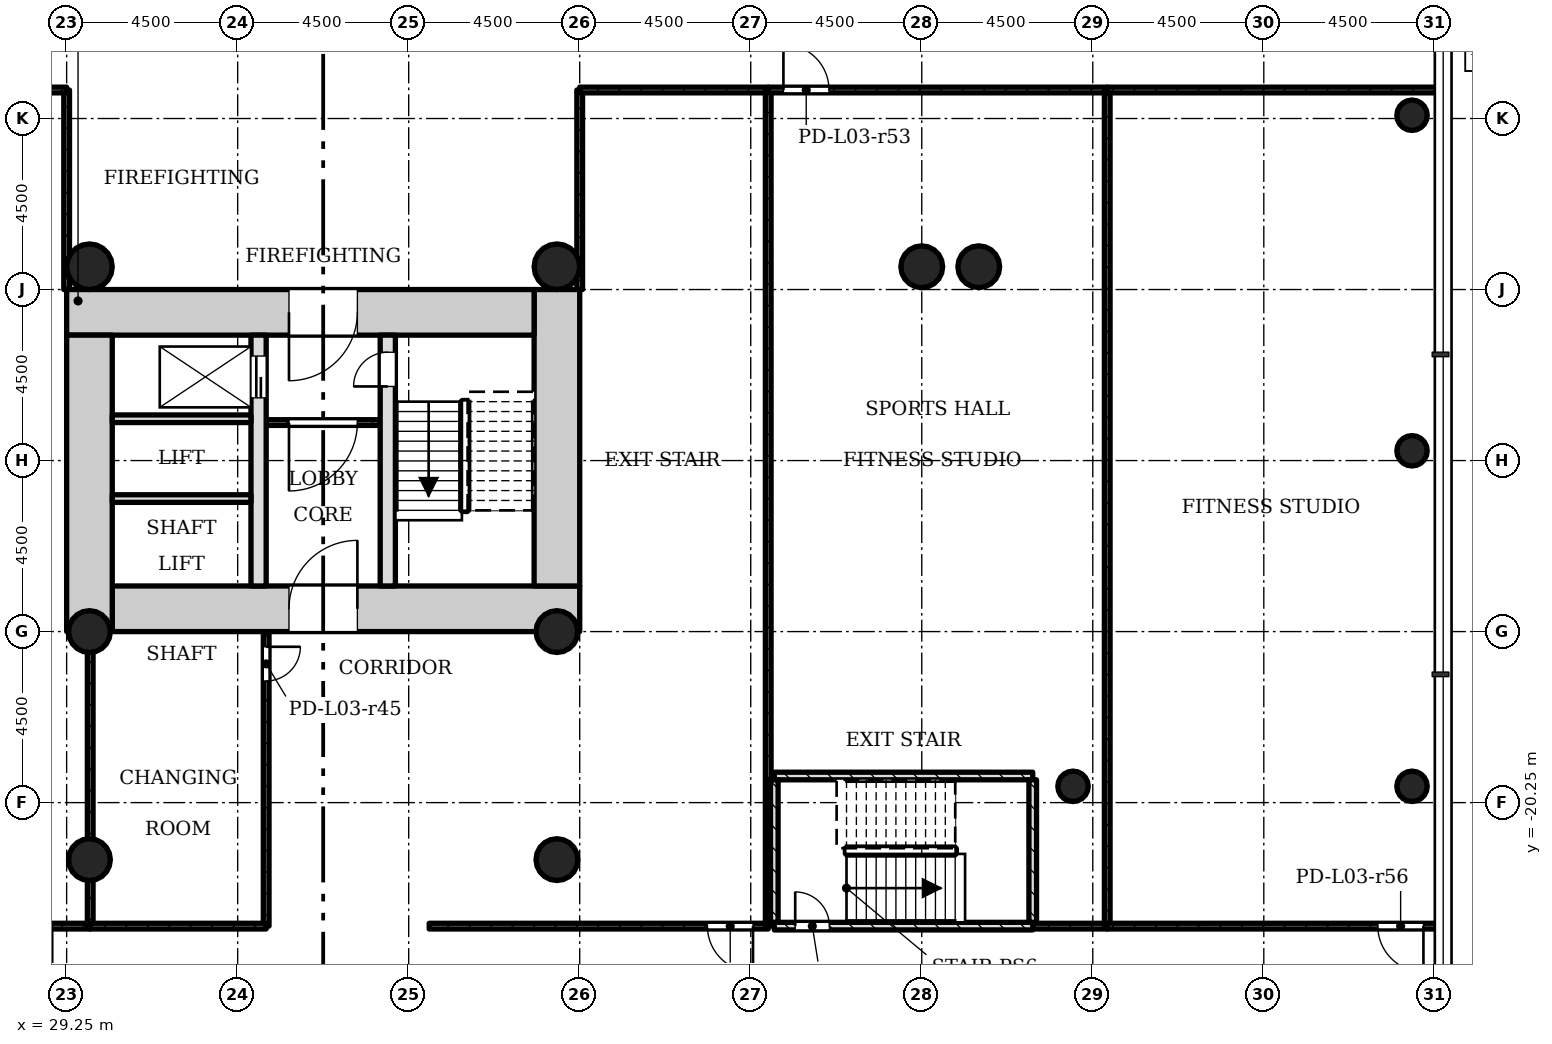
"""IFC4 building model, lengths in metres.
Left out: names, types, materials, properties, quantities, classifications, styles, units other than length and angle.
Written with IfcOpenShell. Run it as: python <this file> out.ifc"""

import sys

from ifc_helpers import new_model, si_unit, direction, frame, frame_2d, origin, origin_2d, place, context, subcontext, project, spatial, rectangle, hollow_circle, extrude, element, fill, save


model = new_model("IFC4")
c1 = context("Model", 3, precision=1e-05, world=origin(), true_north=direction((0.0, 1.0)))
c2 = subcontext(c1, "Body", "Model", "MODEL_VIEW")
j1 = project(units=[si_unit("LENGTHUNIT", "METRE"), si_unit("PLANEANGLEUNIT", "RADIAN")], contexts=[c1])
p1 = place(None, origin())
s1 = spatial("IfcSite", under=j1, at=p1, CompositionType="ELEMENT")
p2 = place(p1, origin())
s2 = spatial("IfcBuilding", under=s1, at=p2, CompositionType="ELEMENT")
p3 = place(p2, frame((0.0, 0.0, 15.5)))
s3 = spatial("IfcBuildingStorey", under=s2, at=p3, CompositionType="ELEMENT", Elevation=15.5)
p4 = place(p3, frame((30.45, -15.15, 0.0), z_axis=(0.0, 0.0, 1.0), x_axis=(1.0, 0.0, 0.0)))
e1 = element("IfcWall", 1, at=p4, inside=s3, PredefinedType="SHEAR", context=c2, shape_type="SweptSolid", body=[
    extrude(rectangle(XDim=12.3, YDim=1.2, at=frame_2d((6.15, 0.0))), origin(), (0.0, 0.0, 1.0), 4.5),
])
p5 = place(p4, frame((4.65, 0.0, 0.0)))
e2 = element("IfcOpeningElement", 2, at=p5, cuts=e1, PredefinedType="OPENING", context=c2, shape_type="SweptSolid", body=[
    extrude(rectangle(XDim=1.8, YDim=2.1, at=frame_2d((0.9, 1.05))), frame((0.0, 0.61, 0.0), z_axis=(0.0, -1.0, 0.0), x_axis=(1.0, 0.0, 0.0)), (0.0, 0.0, 1.0), 1.22),
])
p6 = place(p3, frame((42.15, -14.55, 0.0), z_axis=(0.0, 0.0, 1.0), x_axis=(0.0, 1.0, 0.0)))
e3 = element("IfcWall", 3, at=p6, inside=s3, PredefinedType="SHEAR", context=c2, shape_type="SweptSolid", body=[
    extrude(rectangle(XDim=7.8, YDim=1.2, at=frame_2d((3.9, 0.0))), origin(), (0.0, 0.0, 1.0), 4.5),
])
p7 = place(p3, frame((41.55, -7.35, 0.0), z_axis=(0.0, 0.0, 1.0), x_axis=(-1.0, 0.0, 0.0)))
e4 = element("IfcWall", 4, at=p7, inside=s3, PredefinedType="SHEAR", context=c2, shape_type="SweptSolid", body=[
    extrude(rectangle(XDim=12.3, YDim=1.2, at=frame_2d((6.15, 0.0))), origin(), (0.0, 0.0, 1.0), 4.5),
])
p8 = place(p7, frame((4.65, 0.0, 0.0)))
e5 = element("IfcOpeningElement", 5, at=p8, cuts=e4, PredefinedType="OPENING", context=c2, shape_type="SweptSolid", body=[
    extrude(rectangle(XDim=1.8, YDim=2.1, at=frame_2d((0.9, 1.05))), frame((0.0, 0.61, 0.0), z_axis=(0.0, -1.0, 0.0), x_axis=(1.0, 0.0, 0.0)), (0.0, 0.0, 1.0), 1.22),
])
p9 = place(p3, frame((29.85, -7.95, 0.0), z_axis=(0.0, 0.0, 1.0), x_axis=(0.0, -1.0, 0.0)))
e6 = element("IfcWall", 6, at=p9, inside=s3, PredefinedType="SHEAR", context=c2, shape_type="SweptSolid", body=[
    extrude(rectangle(XDim=7.8, YDim=1.2, at=frame_2d((3.9, 0.0))), origin(), (0.0, 0.0, 1.0), 4.5),
])
p10 = place(p3, frame((34.3, -14.55, 0.0), z_axis=(0.0, 0.0, 1.0), x_axis=(0.0, 1.0, 0.0)))
e7 = element("IfcWall", 7, at=p10, inside=s3, PredefinedType="SHEAR", context=c2, shape_type="SweptSolid", body=[
    extrude(rectangle(XDim=6.6, YDim=0.4, at=frame_2d((3.3, 0.0))), origin(), (0.0, 0.0, 1.0), 4.5),
])
p11 = place(p10, frame((4.95, 0.0, 0.0)))
e8 = element("IfcOpeningElement", 8, at=p11, cuts=e7, PredefinedType="OPENING", context=c2, shape_type="SweptSolid", body=[
    extrude(rectangle(XDim=1.1, YDim=2.1, at=frame_2d((0.55, 1.05))), frame((0.0, 0.21, 0.0), z_axis=(0.0, -1.0, 0.0), x_axis=(1.0, 0.0, 0.0)), (0.0, 0.0, 1.0), 0.42),
])
p12 = place(p3, frame((37.7, -14.55, 0.0), z_axis=(0.0, 0.0, 1.0), x_axis=(0.0, 1.0, 0.0)))
e9 = element("IfcWall", 9, at=p12, inside=s3, PredefinedType="SHEAR", context=c2, shape_type="SweptSolid", body=[
    extrude(rectangle(XDim=6.6, YDim=0.4, at=frame_2d((3.3, 0.0))), origin(), (0.0, 0.0, 1.0), 4.5),
])
p13 = place(p12, frame((5.25, 0.0, 0.0)))
e10 = element("IfcOpeningElement", 10, at=p13, cuts=e9, PredefinedType="OPENING", context=c2, shape_type="SweptSolid", body=[
    extrude(rectangle(XDim=0.9, YDim=2.1, at=frame_2d((0.45, 1.05))), frame((0.0, 0.21, 0.0), z_axis=(0.0, -1.0, 0.0), x_axis=(1.0, 0.0, 0.0)), (0.0, 0.0, 1.0), 0.42),
])
for number, where, z_axis, x_axis in (
    (11, (42.15, -15.75, 0.0), (0.0, 0.0, 1.0), (1.0, 0.0, 0.0)),
    (12, (29.85, -15.75, 0.0), (0.0, 0.0, 1.0), (1.0, 0.0, 0.0)),
    (13, (42.15, -21.75, 0.0), (0.0, 0.0, 1.0), (1.0, 0.0, 0.0)),
    (14, (29.85, -21.75, 0.0), (0.0, 0.0, 1.0), (1.0, 0.0, 0.0)),
    (15, (51.75, -6.15, 0.0), (0.0, 0.0, 1.0), (1.0, 0.0, 0.0)),
    (16, (53.25, -6.15, 0.0), (0.0, 0.0, 1.0), (1.0, 0.0, 0.0)),
):
    element("IfcColumn", number, at=place(p3, frame(where, z_axis=z_axis, x_axis=x_axis)), inside=s3, PredefinedType="COLUMN", context=c2, shape_type="SweptSolid", body=[
        extrude(hollow_circle(Radius=0.55, WallThickness=0.04, at=origin_2d()), origin(), (0.0, 0.0, 1.0), 4.5),
    ])
for number, where, z_axis, x_axis in (
    (17, (42.15, -6.15, 0.0), (0.0, 0.0, 1.0), (1.0, 0.0, 0.0)),
    (18, (29.85, -6.15, 0.0), (0.0, 0.0, 1.0), (1.0, 0.0, 0.0)),
):
    element("IfcColumn", number, at=place(p3, frame(where, z_axis=z_axis, x_axis=x_axis)), inside=s3, PredefinedType="COLUMN", context=c2, shape_type="SweptSolid", body=[
        extrude(hollow_circle(Radius=0.6, WallThickness=0.045, at=origin_2d()), origin(), (0.0, 0.0, 1.0), 4.5),
    ])
for number, where, z_axis, x_axis in (
    (19, (55.73, -19.821, 0.0), (0.0, 0.0, 1.0), (1.0, 0.0, 0.0)),
    (20, (64.65, -19.821, 0.0), (0.0, 0.0, 1.0), (1.0, 0.0, 0.0)),
    (21, (64.65, -10.993, 0.0), (0.0, 0.0, 1.0), (1.0, 0.0, 0.0)),
    (22, (64.65, -2.164, 0.0), (0.0, 0.0, 1.0), (1.0, 0.0, 0.0)),
):
    element("IfcColumn", number, at=place(p3, frame(where, z_axis=z_axis, x_axis=x_axis)), inside=s3, PredefinedType="COLUMN", context=c2, shape_type="SweptSolid", body=[
        extrude(hollow_circle(Radius=0.4, WallThickness=0.028, at=origin_2d()), origin(), (0.0, 0.0, 1.0), 4.5),
    ])
p14 = place(p3, frame((34.5, -10.25, 0.0), z_axis=(0.0, 0.0, 1.0), x_axis=(1.0, 0.0, 0.0)))
e23 = element("IfcWall", 23, at=p14, inside=s3, PredefinedType="PARTITIONING", context=c2, shape_type="SweptSolid", body=[
    extrude(rectangle(XDim=3.0, YDim=0.15, at=frame_2d((1.5, 0.0))), origin(), (0.0, 0.0, 1.0), 4.08),
])
p15 = place(p14, frame((0.6, 0.0, 0.0)))
e24 = element("IfcOpeningElement", 24, at=p15, cuts=e23, PredefinedType="OPENING", context=c2, shape_type="SweptSolid", body=[
    extrude(rectangle(XDim=1.8, YDim=2.1, at=frame_2d((0.9, 1.05))), frame((0.0, 0.085, 0.0), z_axis=(0.0, -1.0, 0.0), x_axis=(1.0, 0.0, 0.0)), (0.0, 0.0, 1.0), 0.17),
])
for number, where, z_axis, x_axis in (
    (25, (30.45, -10.15, 0.0), (0.0, 0.0, 1.0), (1.0, 0.0, 0.0)),
    (26, (30.45, -12.25, 0.0), (0.0, 0.0, 1.0), (1.0, 0.0, 0.0)),
):
    element("IfcWall", number, at=place(p3, frame(where, z_axis=z_axis, x_axis=x_axis)), inside=s3, PredefinedType="SOLIDWALL", context=c2, shape_type="SweptSolid", body=[
        extrude(rectangle(XDim=3.65, YDim=0.2, at=frame_2d((1.825, 0.0))), origin(), (0.0, 0.0, 1.0), 4.08),
    ])
p16 = place(p3, frame((29.25, -1.5, 0.0), z_axis=(0.0, 0.0, 1.0), x_axis=(0.0, -1.0, 0.0)))
e27 = element("IfcWall", 27, at=p16, inside=s3, PredefinedType="PARTITIONING", context=c2, shape_type="SweptSolid", body=[
    extrude(rectangle(XDim=5.25, YDim=0.15, at=frame_2d((2.625, 0.0))), origin(), (0.0, 0.0, 1.0), 4.08),
])
p17 = place(p3, frame((29.87, -23.5, 0.0), z_axis=(0.0, 0.0, 1.0), x_axis=(-1.0, 0.0, 0.0)))
e28 = element("IfcWall", 28, at=p17, inside=s3, PredefinedType="PARTITIONING", context=c2, shape_type="SweptSolid", body=[
    extrude(rectangle(XDim=8.92, YDim=0.15, at=frame_2d((4.46, 0.0))), origin(), (0.0, 0.0, 1.0), 4.08),
])
p18 = place(p17, frame((1.0, 0.0, 0.0)))
e29 = element("IfcOpeningElement", 29, at=p18, cuts=e28, PredefinedType="OPENING", context=c2, shape_type="SweptSolid", body=[
    extrude(rectangle(XDim=1.2, YDim=2.1, at=frame_2d((0.6, 1.05))), frame((0.0, 0.085, 0.0), z_axis=(0.0, -1.0, 0.0), x_axis=(1.0, 0.0, 0.0)), (0.0, 0.0, 1.0), 0.17),
])
p19 = place(p3, frame((20.95, -1.5, 0.0), z_axis=(0.0, 0.0, 1.0), x_axis=(1.0, 0.0, 0.0)))
e30 = element("IfcWall", 30, at=p19, inside=s3, PredefinedType="PARTITIONING", context=c2, shape_type="SweptSolid", body=[
    extrude(rectangle(XDim=8.3, YDim=0.15, at=frame_2d((4.15, 0.0))), origin(), (0.0, 0.0, 1.0), 4.08),
])
p20 = place(p3, frame((29.87, -15.75, 0.0), z_axis=(0.0, 0.0, 1.0), x_axis=(0.0, -1.0, 0.0)))
e31 = element("IfcWall", 31, at=p20, inside=s3, PredefinedType="PARTITIONING", context=c2, shape_type="SweptSolid", body=[
    extrude(rectangle(XDim=7.75, YDim=0.15, at=frame_2d((3.875, 0.0))), origin(), (0.0, 0.0, 1.0), 4.08),
])
p21 = place(p3, frame((34.5, -15.75, 0.0), z_axis=(0.0, 0.0, 1.0), x_axis=(0.0, -1.0, 0.0)))
e32 = element("IfcWall", 32, at=p21, inside=s3, PredefinedType="PARTITIONING", context=c2, shape_type="SweptSolid", body=[
    extrude(rectangle(XDim=7.75, YDim=0.15, at=frame_2d((3.875, 0.0))), origin(), (0.0, 0.0, 1.0), 4.08),
])
p22 = place(p21, frame((0.4, 0.0, 0.0)))
e33 = element("IfcOpeningElement", 33, at=p22, cuts=e32, PredefinedType="OPENING", context=c2, shape_type="SweptSolid", body=[
    extrude(rectangle(XDim=0.9, YDim=2.1, at=frame_2d((0.45, 1.05))), frame((0.0, 0.085, 0.0), z_axis=(0.0, -1.0, 0.0), x_axis=(1.0, 0.0, 0.0)), (0.0, 0.0, 1.0), 0.17),
])
p23 = place(p3, frame((34.5, -23.5, 0.0), z_axis=(0.0, 0.0, 1.0), x_axis=(-1.0, 0.0, 0.0)))
e34 = element("IfcWall", 34, at=p23, inside=s3, PredefinedType="PARTITIONING", context=c2, shape_type="SweptSolid", body=[
    extrude(rectangle(XDim=4.63, YDim=0.15, at=frame_2d((2.315, 0.0))), origin(), (0.0, 0.0, 1.0), 4.08),
])
p24 = place(p3, frame((42.75, -6.75, 0.0), z_axis=(0.0, 0.0, 1.0), x_axis=(0.0, 1.0, 0.0)))
e35 = element("IfcWall", 35, at=p24, inside=s3, PredefinedType="PARTITIONING", context=c2, shape_type="SweptSolid", body=[
    extrude(rectangle(XDim=5.25, YDim=0.15, at=frame_2d((2.625, 0.0))), origin(), (0.0, 0.0, 1.0), 4.08),
])
p25 = place(p3, frame((42.75, -1.5, 0.0), z_axis=(0.0, 0.0, 1.0), x_axis=(1.0, 0.0, 0.0)))
e36 = element("IfcWall", 36, at=p25, inside=s3, PredefinedType="PARTITIONING", context=c2, shape_type="SweptSolid", body=[
    extrude(rectangle(XDim=4.96, YDim=0.15, at=frame_2d((2.48, 0.0))), origin(), (0.0, 0.0, 1.0), 4.08),
])
p26 = place(p3, frame((47.71, -23.5, 0.0), z_axis=(0.0, 0.0, 1.0), x_axis=(-1.0, 0.0, 0.0)))
e37 = element("IfcWall", 37, at=p26, inside=s3, PredefinedType="PARTITIONING", context=c2, shape_type="SweptSolid", body=[
    extrude(rectangle(XDim=8.92, YDim=0.15, at=frame_2d((4.46, 0.0))), origin(), (0.0, 0.0, 1.0), 4.08),
])
p27 = place(p26, frame((0.4, 0.0, 0.0)))
e38 = element("IfcOpeningElement", 38, at=p27, cuts=e37, PredefinedType="OPENING", context=c2, shape_type="SweptSolid", body=[
    extrude(rectangle(XDim=1.2, YDim=2.1, at=frame_2d((0.6, 1.05))), frame((0.0, 0.085, 0.0), z_axis=(0.0, -1.0, 0.0), x_axis=(1.0, 0.0, 0.0)), (0.0, 0.0, 1.0), 0.17),
])
p28 = place(p3, frame((47.71, -1.5, 0.0), z_axis=(0.0, 0.0, 1.0), x_axis=(0.0, -1.0, 0.0)))
e39 = element("IfcWall", 39, at=p28, inside=s3, PredefinedType="PARTITIONING", context=c2, shape_type="SweptSolid", body=[
    extrude(rectangle(XDim=22.0, YDim=0.15, at=frame_2d((11.0, 0.0))), origin(), (0.0, 0.0, 1.0), 4.08),
])
p29 = place(p3, frame((56.63, -23.5, 0.0), z_axis=(0.0, 0.0, 1.0), x_axis=(-1.0, 0.0, 0.0)))
e40 = element("IfcWall", 40, at=p29, inside=s3, PredefinedType="PARTITIONING", context=c2, shape_type="SweptSolid", body=[
    extrude(rectangle(XDim=1.96, YDim=0.15, at=frame_2d((0.98, 0.0))), origin(), (0.0, 0.0, 1.0), 4.08),
])
p30 = place(p3, frame((47.71, -1.5, 0.0), z_axis=(0.0, 0.0, 1.0), x_axis=(1.0, 0.0, 0.0)))
e41 = element("IfcWall", 41, at=p30, inside=s3, PredefinedType="PARTITIONING", context=c2, shape_type="SweptSolid", body=[
    extrude(rectangle(XDim=8.92, YDim=0.15, at=frame_2d((4.46, 0.0))), origin(), (0.0, 0.0, 1.0), 4.08),
])
p31 = place(p30, frame((0.4, 0.0, 0.0)))
e42 = element("IfcOpeningElement", 42, at=p31, cuts=e41, PredefinedType="OPENING", context=c2, shape_type="SweptSolid", body=[
    extrude(rectangle(XDim=1.2, YDim=2.1, at=frame_2d((0.6, 1.05))), frame((0.0, 0.085, 0.0), z_axis=(0.0, -1.0, 0.0), x_axis=(1.0, 0.0, 0.0)), (0.0, 0.0, 1.0), 0.17),
])
p32 = place(p3, frame((56.63, -1.5, 0.0), z_axis=(0.0, 0.0, 1.0), x_axis=(0.0, -1.0, 0.0)))
e43 = element("IfcWall", 43, at=p32, inside=s3, PredefinedType="PARTITIONING", context=c2, shape_type="SweptSolid", body=[
    extrude(rectangle(XDim=22.0, YDim=0.15, at=frame_2d((11.0, 0.0))), origin(), (0.0, 0.0, 1.0), 4.08),
])
p33 = place(p3, frame((65.35, -23.5, 0.0), z_axis=(0.0, 0.0, 1.0), x_axis=(-1.0, 0.0, 0.0)))
e44 = element("IfcWall", 44, at=p33, inside=s3, PredefinedType="PARTITIONING", context=c2, shape_type="SweptSolid", body=[
    extrude(rectangle(XDim=8.72, YDim=0.15, at=frame_2d((4.36, 0.0))), origin(), (0.0, 0.0, 1.0), 4.08),
])
p34 = place(p33, frame((0.4, 0.0, 0.0)))
e45 = element("IfcOpeningElement", 45, at=p34, cuts=e44, PredefinedType="OPENING", context=c2, shape_type="SweptSolid", body=[
    extrude(rectangle(XDim=1.2, YDim=2.1, at=frame_2d((0.6, 1.05))), frame((0.0, 0.085, 0.0), z_axis=(0.0, -1.0, 0.0), x_axis=(1.0, 0.0, 0.0)), (0.0, 0.0, 1.0), 0.17),
])
p35 = place(p3, frame((56.63, -1.5, 0.0), z_axis=(0.0, 0.0, 1.0), x_axis=(1.0, 0.0, 0.0)))
e46 = element("IfcWall", 46, at=p35, inside=s3, PredefinedType="PARTITIONING", context=c2, shape_type="SweptSolid", body=[
    extrude(rectangle(XDim=8.72, YDim=0.15, at=frame_2d((4.36, 0.0))), origin(), (0.0, 0.0, 1.0), 4.08),
])
p36 = place(p3, frame((47.87, -23.5, 0.0), z_axis=(0.0, 0.0, 1.0), x_axis=(1.0, 0.0, 0.0)))
e47 = element("IfcWall", 47, at=p36, inside=s3, PredefinedType="SHEAR", context=c2, shape_type="SweptSolid", body=[
    extrude(rectangle(XDim=6.8, YDim=0.2, at=frame_2d((3.4, 0.0))), origin(), (0.0, 0.0, 1.0), 4.08),
])
p37 = place(p36, frame((0.55, 0.0, 0.0)))
e48 = element("IfcOpeningElement", 48, at=p37, cuts=e47, PredefinedType="OPENING", context=c2, shape_type="SweptSolid", body=[
    extrude(rectangle(XDim=0.9, YDim=2.1, at=frame_2d((0.45, 1.05))), frame((0.0, 0.11, 0.0), z_axis=(0.0, -1.0, 0.0), x_axis=(1.0, 0.0, 0.0)), (0.0, 0.0, 1.0), 0.22),
])
p38 = place(p3, frame((47.87, -19.55, 0.0), z_axis=(0.0, 0.0, 1.0), x_axis=(1.0, 0.0, 0.0)))
e49 = element("IfcWall", 49, at=p38, inside=s3, PredefinedType="SHEAR", context=c2, shape_type="SweptSolid", body=[
    extrude(rectangle(XDim=6.8, YDim=0.2, at=frame_2d((3.4, 0.0))), origin(), (0.0, 0.0, 1.0), 4.08),
])
for number, where, z_axis, x_axis in (
    (50, (47.87, -23.4, 0.0), (0.0, 0.0, 1.0), (0.0, 1.0, 0.0)),
    (51, (54.67, -23.4, 0.0), (0.0, 0.0, 1.0), (0.0, 1.0, 0.0)),
):
    element("IfcWall", number, at=place(p3, frame(where, z_axis=z_axis, x_axis=x_axis)), inside=s3, PredefinedType="SHEAR", context=c2, shape_type="SweptSolid", body=[
        extrude(rectangle(XDim=3.75, YDim=0.2, at=frame_2d((1.875, 0.0))), origin(), (0.0, 0.0, 1.0), 4.08),
    ])
p39 = place(p15, origin())
e52 = element("IfcDoor", 52, at=p39, inside=s3, OperationType="SINGLE_SWING_LEFT", PredefinedType="DOOR", context=c2, shape_type="SweptSolid", body=[
    extrude(rectangle(XDim=1.8, YDim=2.1, at=frame_2d((0.9, 1.05))), frame((0.0, 0.025, 0.0), z_axis=(0.0, -1.0, 0.0), x_axis=(1.0, 0.0, 0.0)), (0.0, 0.0, 1.0), 0.05),
])
fill(e24, e52)
p40 = place(p22, origin())
e53 = element("IfcDoor", 53, at=p40, inside=s3, OperationType="SINGLE_SWING_RIGHT", PredefinedType="DOOR", context=c2, shape_type="SweptSolid", body=[
    extrude(rectangle(XDim=0.9, YDim=2.1, at=frame_2d((0.45, 1.05))), frame((0.0, 0.025, 0.0), z_axis=(0.0, -1.0, 0.0), x_axis=(1.0, 0.0, 0.0)), (0.0, 0.0, 1.0), 0.05),
])
fill(e33, e53)
p41 = place(p27, origin())
e54 = element("IfcDoor", 54, at=p41, inside=s3, OperationType="SINGLE_SWING_RIGHT", PredefinedType="DOOR", context=c2, shape_type="SweptSolid", body=[
    extrude(rectangle(XDim=1.2, YDim=2.1, at=frame_2d((0.6, 1.05))), frame((0.0, 0.025, 0.0), z_axis=(0.0, -1.0, 0.0), x_axis=(1.0, 0.0, 0.0)), (0.0, 0.0, 1.0), 0.05),
])
fill(e38, e54)
p42 = place(p31, origin())
e55 = element("IfcDoor", 55, at=p42, inside=s3, OperationType="SINGLE_SWING_RIGHT", PredefinedType="DOOR", context=c2, shape_type="SweptSolid", body=[
    extrude(rectangle(XDim=1.2, YDim=2.1, at=frame_2d((0.6, 1.05))), frame((0.0, 0.025, 0.0), z_axis=(0.0, -1.0, 0.0), x_axis=(1.0, 0.0, 0.0)), (0.0, 0.0, 1.0), 0.05),
])
fill(e42, e55)
p43 = place(p34, origin())
e56 = element("IfcDoor", 56, at=p43, inside=s3, OperationType="SINGLE_SWING_RIGHT", PredefinedType="DOOR", context=c2, shape_type="SweptSolid", body=[
    extrude(rectangle(XDim=1.2, YDim=2.1, at=frame_2d((0.6, 1.05))), frame((0.0, 0.025, 0.0), z_axis=(0.0, -1.0, 0.0), x_axis=(1.0, 0.0, 0.0)), (0.0, 0.0, 1.0), 0.05),
])
fill(e45, e56)
p44 = place(p37, origin())
e57 = element("IfcDoor", 57, at=p44, inside=s3, OperationType="SINGLE_SWING_RIGHT", PredefinedType="DOOR", context=c2, shape_type="SweptSolid", body=[
    extrude(rectangle(XDim=0.9, YDim=2.1, at=frame_2d((0.45, 1.05))), frame((0.0, 0.025, 0.0), z_axis=(0.0, -1.0, 0.0), x_axis=(1.0, 0.0, 0.0)), (0.0, 0.0, 1.0), 0.05),
])
fill(e48, e57)
p45 = place(p13, origin())
e58 = element("IfcDoor", 58, at=p45, inside=s3, OperationType="SINGLE_SWING_RIGHT", PredefinedType="DOOR", context=c2, shape_type="SweptSolid", body=[
    extrude(rectangle(XDim=0.9, YDim=2.1, at=frame_2d((0.45, 1.05))), frame((0.0, 0.025, 0.0), z_axis=(0.0, -1.0, 0.0), x_axis=(1.0, 0.0, 0.0)), (0.0, 0.0, 1.0), 0.05),
])
fill(e10, e58)
p46 = place(p11, origin())
e59 = element("IfcDoor", 59, at=p46, inside=s3, OperationType="SLIDING_TO_LEFT", PredefinedType="DOOR", context=c2, shape_type="SweptSolid", body=[
    extrude(rectangle(XDim=1.1, YDim=2.1, at=frame_2d((0.55, 1.05))), frame((0.0, 0.025, 0.0), z_axis=(0.0, -1.0, 0.0), x_axis=(1.0, 0.0, 0.0)), (0.0, 0.0, 1.0), 0.05),
])
fill(e8, e59)
p47 = place(p8, origin())
e60 = element("IfcDoor", 60, at=p47, inside=s3, OperationType="SINGLE_SWING_LEFT", PredefinedType="DOOR", context=c2, shape_type="SweptSolid", body=[
    extrude(rectangle(XDim=1.8, YDim=2.1, at=frame_2d((0.9, 1.05))), frame((0.0, 0.025, 0.0), z_axis=(0.0, -1.0, 0.0), x_axis=(1.0, 0.0, 0.0)), (0.0, 0.0, 1.0), 0.05),
])
fill(e5, e60)
p48 = place(p5, origin())
e61 = element("IfcDoor", 61, at=p48, inside=s3, OperationType="SINGLE_SWING_LEFT", PredefinedType="DOOR", context=c2, shape_type="SweptSolid", body=[
    extrude(rectangle(XDim=1.8, YDim=2.1, at=frame_2d((0.9, 1.05))), frame((0.0, 0.025, 0.0), z_axis=(0.0, -1.0, 0.0), x_axis=(1.0, 0.0, 0.0)), (0.0, 0.0, 1.0), 0.05),
])
fill(e2, e61)
save(model, sys.argv[1])
